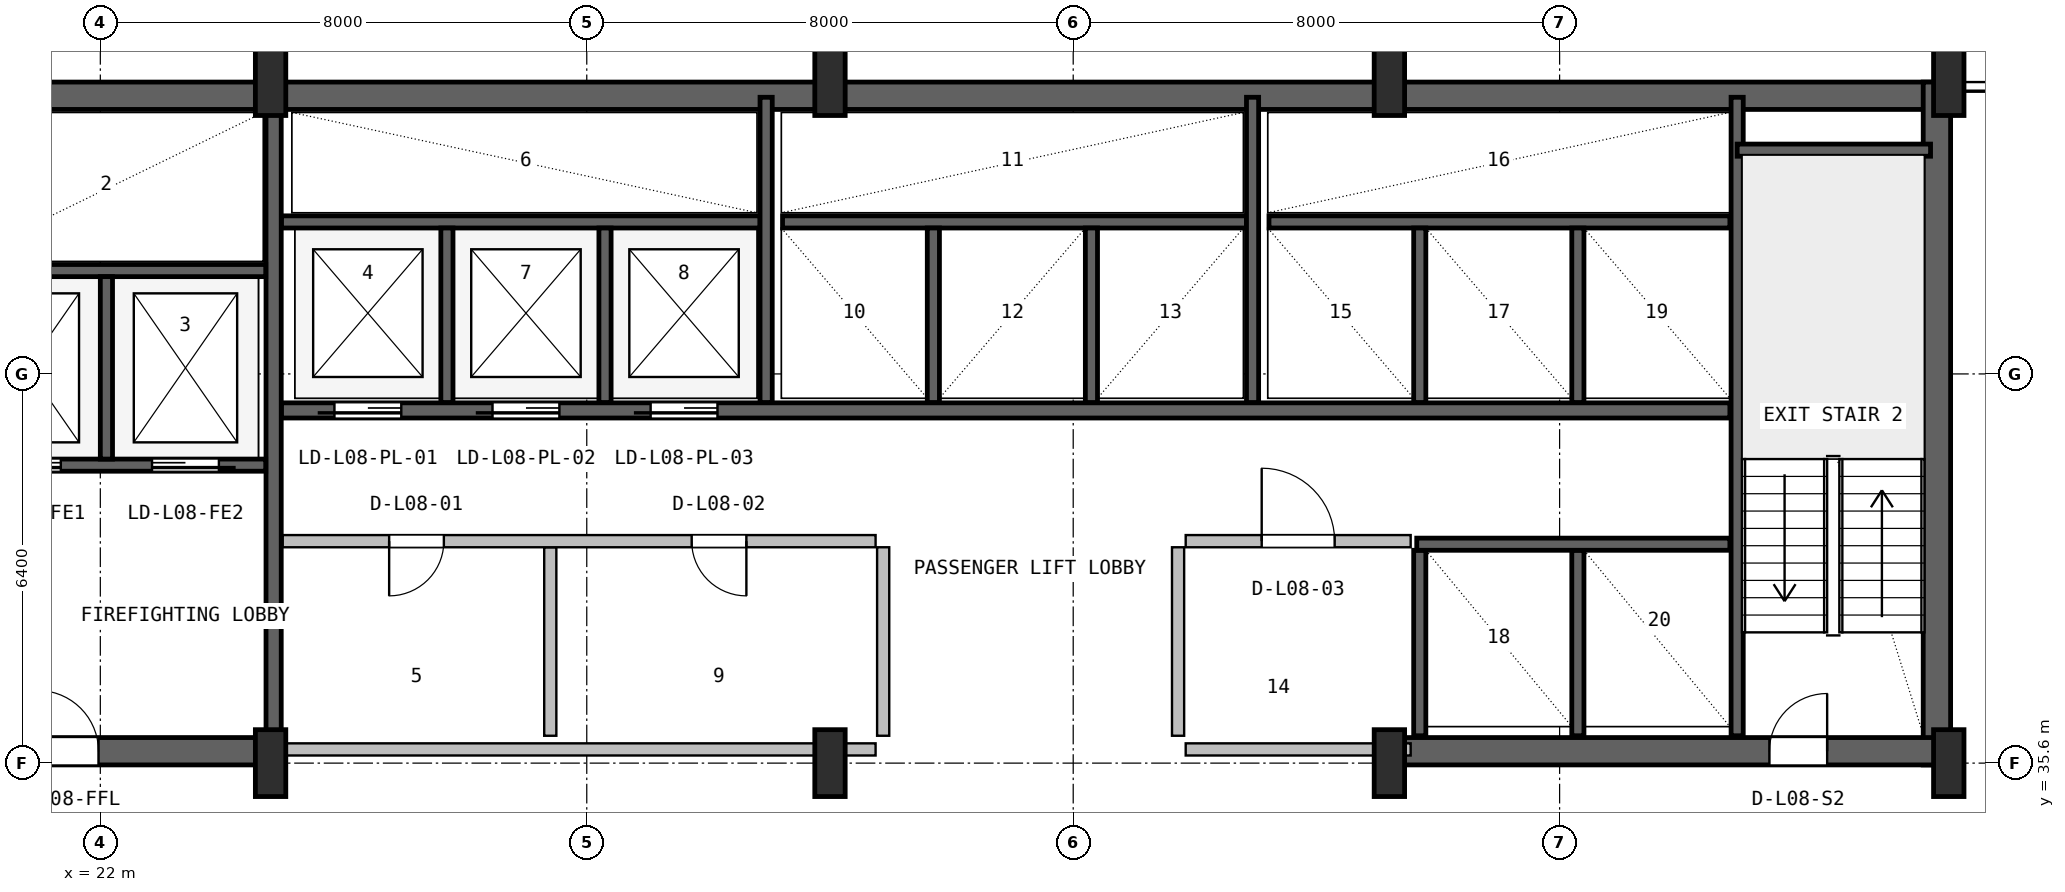
"""IFC4 building model, lengths in metres.
Left out: names, types, materials, properties, quantities, classifications, styles, units other than length and angle.
Written with IfcOpenShell. Run it as: python <this file> out.ifc"""

import sys

from ifc_helpers import new_model, si_unit, direction, frame, frame_2d, origin, origin_2d, place, context, subcontext, project, spatial, rectangle, i_section, extrude, source, transform, mapped, element, fill, save


model = new_model("IFC4")
c1 = context("Model", 3, precision=1e-05, world=origin(), true_north=direction((0.0, 1.0)))
c2 = subcontext(c1, "Body", "Model", "MODEL_VIEW")
j1 = project(units=[si_unit("LENGTHUNIT", "METRE"), si_unit("PLANEANGLEUNIT", "RADIAN")], contexts=[c1])
p1 = place(None, origin())
s1 = spatial("IfcSite", under=j1, at=p1, CompositionType="ELEMENT")
p2 = place(p1, origin())
s2 = spatial("IfcBuilding", under=s1, at=p2, CompositionType="ELEMENT")
p3 = place(p2, frame((0.0, 0.0, 39.3)))
s3 = spatial("IfcBuildingStorey", under=s2, at=p3, CompositionType="ELEMENT", Elevation=39.3)
p4 = place(p3, frame((15.6, 46.575, 0.0), z_axis=(0.0, 0.0, 1.0), x_axis=(1.0, 0.0, 0.0)))
e1 = element("IfcWall", 1, at=p4, inside=s3, PredefinedType="SHEAR", context=c2, shape_type="SweptSolid", body=[
    extrude(rectangle(XDim=36.8, YDim=0.45, at=frame_2d((18.4, 0.0))), origin(), (0.0, 0.0, 1.0), 3.65),
])
p5 = place(p3, frame((52.205, 35.57, 0.0), z_axis=(0.0, 0.0, 1.0), x_axis=(0.0, 1.0, 0.0)))
e2 = element("IfcWall", 2, at=p5, inside=s3, PredefinedType="SHEAR", context=c2, shape_type="SweptSolid", body=[
    extrude(rectangle(XDim=11.23, YDim=0.45, at=frame_2d((5.615, 0.0))), origin(), (0.0, 0.0, 1.0), 3.65),
])
p6 = place(p3, frame((15.57, 35.795, 0.0), z_axis=(0.0, 0.0, 1.0), x_axis=(1.0, 0.0, 0.0)))
e3 = element("IfcWall", 3, at=p6, inside=s3, PredefinedType="SHEAR", context=c2, shape_type="SweptSolid", body=[
    extrude(rectangle(XDim=9.23, YDim=0.45, at=frame_2d((4.615, 0.0))), origin(), (0.0, 0.0, 1.0), 3.65),
])
p7 = place(p6, frame((5.4, 0.0, 0.0)))
e4 = element("IfcOpeningElement", 4, at=p7, cuts=e3, PredefinedType="OPENING", context=c2, shape_type="SweptSolid", body=[
    extrude(rectangle(XDim=1.0, YDim=2.1, at=frame_2d((0.5, 1.05))), frame((0.0, 0.235, 0.0), z_axis=(0.0, -1.0, 0.0), x_axis=(1.0, 0.0, 0.0)), (0.0, 0.0, 1.0), 0.47),
])
p8 = place(p3, frame((43.2, 35.795, 0.0), z_axis=(0.0, 0.0, 1.0), x_axis=(1.0, 0.0, 0.0)))
e5 = element("IfcWall", 5, at=p8, inside=s3, PredefinedType="SHEAR", context=c2, shape_type="SweptSolid", body=[
    extrude(rectangle(XDim=9.23, YDim=0.45, at=frame_2d((4.615, 0.0))), origin(), (0.0, 0.0, 1.0), 3.65),
])
p9 = place(p8, frame((6.25, 0.0, 0.0)))
e6 = element("IfcOpeningElement", 6, at=p9, cuts=e5, PredefinedType="OPENING", context=c2, shape_type="SweptSolid", body=[
    extrude(rectangle(XDim=0.95, YDim=2.1, at=frame_2d((0.475, 1.05))), frame((0.0, 0.235, 0.0), z_axis=(0.0, -1.0, 0.0), x_axis=(1.0, 0.0, 0.0)), (0.0, 0.0, 1.0), 0.47),
])
m1 = source(origin(), c2, "Body", "SweptSolid", [
    extrude(i_section(OverallWidth=0.5, OverallDepth=1.1, WebThickness=0.018, FlangeThickness=0.032, FilletRadius=0.018, at=origin_2d()), origin(), (0.0, 0.0, 1.0), 3.9),
])
for number, where, z_axis, x_axis in (
    (7, (24.8, 35.6, 0.0), (0.0, 0.0, 1.0), (1.0, 0.0, 0.0)),
    (8, (24.8, 46.8, 0.0), (0.0, 0.0, 1.0), (1.0, 0.0, 0.0)),
    (9, (34.0, 35.6, 0.0), (0.0, 0.0, 1.0), (1.0, 0.0, 0.0)),
    (10, (34.0, 46.8, 0.0), (0.0, 0.0, 1.0), (1.0, 0.0, 0.0)),
    (11, (43.2, 35.6, 0.0), (0.0, 0.0, 1.0), (1.0, 0.0, 0.0)),
    (12, (43.2, 46.8, 0.0), (0.0, 0.0, 1.0), (1.0, 0.0, 0.0)),
    (13, (52.4, 35.6, 0.0), (0.0, 0.0, 1.0), (1.0, 0.0, 0.0)),
    (14, (52.4, 46.8, 0.0), (0.0, 0.0, 1.0), (1.0, 0.0, 0.0)),
):
    element("IfcColumn", number, at=place(p3, frame(where, z_axis=z_axis, x_axis=x_axis)), inside=s3, PredefinedType="COLUMN", context=c2, shape_type="MappedRepresentation", body=[
        mapped(m1, transform((0.0, 0.0, 0.0), x_axis=(1.0, 0.0, 0.0), y_axis=(0.0, 1.0, 0.0), z_axis=(0.0, 0.0, 1.0), scale=1.0)),
    ])
p10 = place(p3, frame((24.85, 36.05, 0.0), z_axis=(0.0, 0.0, 1.0), x_axis=(0.0, 1.0, 0.0)))
e15 = element("IfcWall", 15, at=p10, inside=s3, PredefinedType="SHEAR", context=c2, shape_type="SweptSolid", body=[
    extrude(rectangle(XDim=10.45, YDim=0.25, at=frame_2d((5.225, 0.0))), origin(), (0.0, 0.0, 1.0), 3.65),
])
p11 = place(p3, frame((19.2, 40.5, 0.0), z_axis=(0.0, 0.0, 1.0), x_axis=(1.0, 0.0, 0.0)))
e16 = element("IfcWall", 16, at=p11, inside=s3, PredefinedType="SHEAR", context=c2, shape_type="SweptSolid", body=[
    extrude(rectangle(XDim=5.52, YDim=0.2, at=frame_2d((2.76, 0.0))), origin(), (0.0, 0.0, 1.0), 3.65),
])
p12 = place(p11, frame((1.05, 0.0, 0.0)))
e17 = element("IfcOpeningElement", 17, at=p12, cuts=e16, PredefinedType="OPENING", context=c2, shape_type="SweptSolid", body=[
    extrude(rectangle(XDim=1.1, YDim=2.18, at=frame_2d((0.55, 1.09))), frame((0.0, 0.11, 0.0), z_axis=(0.0, -1.0, 0.0), x_axis=(1.0, 0.0, 0.0)), (0.0, 0.0, 1.0), 0.22),
])
p13 = place(p11, frame((3.65, 0.0, 0.0)))
e18 = element("IfcOpeningElement", 18, at=p13, cuts=e16, PredefinedType="OPENING", context=c2, shape_type="SweptSolid", body=[
    extrude(rectangle(XDim=1.1, YDim=2.18, at=frame_2d((0.55, 1.09))), frame((0.0, 0.11, 0.0), z_axis=(0.0, -1.0, 0.0), x_axis=(1.0, 0.0, 0.0)), (0.0, 0.0, 1.0), 0.22),
])
p14 = place(p3, frame((19.2, 43.7, 0.0), z_axis=(0.0, 0.0, 1.0), x_axis=(1.0, 0.0, 0.0)))
e19 = element("IfcWall", 19, at=p14, inside=s3, PredefinedType="SHEAR", context=c2, shape_type="SweptSolid", body=[
    extrude(rectangle(XDim=5.52, YDim=0.2, at=frame_2d((2.76, 0.0))), origin(), (0.0, 0.0, 1.0), 3.65),
])
p15 = place(p3, frame((22.1, 40.6, 0.0), z_axis=(0.0, 0.0, 1.0), x_axis=(0.0, 1.0, 0.0)))
e20 = element("IfcWall", 20, at=p15, inside=s3, PredefinedType="SHEAR", context=c2, shape_type="SweptSolid", body=[
    extrude(rectangle(XDim=3.0, YDim=0.2, at=frame_2d((1.5, 0.0))), origin(), (0.0, 0.0, 1.0), 3.65),
])
p16 = place(p3, frame((48.92, 36.05, 0.0), z_axis=(0.0, 0.0, 1.0), x_axis=(0.0, 1.0, 0.0)))
e21 = element("IfcWall", 21, at=p16, inside=s3, PredefinedType="SHEAR", context=c2, shape_type="SweptSolid", body=[
    extrude(rectangle(XDim=10.5, YDim=0.2, at=frame_2d((5.25, 0.0))), origin(), (0.0, 0.0, 1.0), 3.65),
])
p17 = place(p3, frame((48.92, 45.68, 0.0), z_axis=(0.0, 0.0, 1.0), x_axis=(1.0, 0.0, 0.0)))
e22 = element("IfcWall", 22, at=p17, inside=s3, PredefinedType="SHEAR", context=c2, shape_type="SweptSolid", body=[
    extrude(rectangle(XDim=3.18, YDim=0.2, at=frame_2d((1.59, 0.0))), origin(), (0.0, 0.0, 1.0), 3.65),
])
p18 = place(p3, frame((24.98, 41.4, 0.0), z_axis=(0.0, 0.0, 1.0), x_axis=(1.0, 0.0, 0.0)))
e23 = element("IfcWall", 23, at=p18, inside=s3, PredefinedType="SHEAR", context=c2, shape_type="SweptSolid", body=[
    extrude(rectangle(XDim=23.82, YDim=0.25, at=frame_2d((11.91, 0.0))), origin(), (0.0, 0.0, 1.0), 3.65),
])
p19 = place(p18, frame((0.87, 0.0, 0.0)))
e24 = element("IfcOpeningElement", 24, at=p19, cuts=e23, PredefinedType="OPENING", context=c2, shape_type="SweptSolid", body=[
    extrude(rectangle(XDim=1.1, YDim=2.18, at=frame_2d((0.55, 1.09))), frame((0.0, 0.135, 0.0), z_axis=(0.0, -1.0, 0.0), x_axis=(1.0, 0.0, 0.0)), (0.0, 0.0, 1.0), 0.27),
])
p20 = place(p18, frame((3.47, 0.0, 0.0)))
e25 = element("IfcOpeningElement", 25, at=p20, cuts=e23, PredefinedType="OPENING", context=c2, shape_type="SweptSolid", body=[
    extrude(rectangle(XDim=1.1, YDim=2.18, at=frame_2d((0.55, 1.09))), frame((0.0, 0.135, 0.0), z_axis=(0.0, -1.0, 0.0), x_axis=(1.0, 0.0, 0.0)), (0.0, 0.0, 1.0), 0.27),
])
p21 = place(p18, frame((6.07, 0.0, 0.0)))
e26 = element("IfcOpeningElement", 26, at=p21, cuts=e23, PredefinedType="OPENING", context=c2, shape_type="SweptSolid", body=[
    extrude(rectangle(XDim=1.1, YDim=2.18, at=frame_2d((0.55, 1.09))), frame((0.0, 0.135, 0.0), z_axis=(0.0, -1.0, 0.0), x_axis=(1.0, 0.0, 0.0)), (0.0, 0.0, 1.0), 0.27),
])
p22 = place(p3, frame((24.98, 44.5, 0.0), z_axis=(0.0, 0.0, 1.0), x_axis=(1.0, 0.0, 0.0)))
e27 = element("IfcWall", 27, at=p22, inside=s3, PredefinedType="SHEAR", context=c2, shape_type="SweptSolid", body=[
    extrude(rectangle(XDim=7.87, YDim=0.2, at=frame_2d((3.935, 0.0))), origin(), (0.0, 0.0, 1.0), 3.65),
])
for number, where, z_axis, x_axis in (
    (28, (27.7, 41.53, 0.0), (0.0, 0.0, 1.0), (0.0, 1.0, 0.0)),
    (29, (30.3, 41.53, 0.0), (0.0, 0.0, 1.0), (0.0, 1.0, 0.0)),
):
    element("IfcWall", number, at=place(p3, frame(where, z_axis=z_axis, x_axis=x_axis)), inside=s3, PredefinedType="SHEAR", context=c2, shape_type="SweptSolid", body=[
        extrude(rectangle(XDim=2.87, YDim=0.2, at=frame_2d((1.435, 0.0))), origin(), (0.0, 0.0, 1.0), 3.65),
    ])
p23 = place(p3, frame((32.95, 41.53, 0.0), z_axis=(0.0, 0.0, 1.0), x_axis=(0.0, 1.0, 0.0)))
e30 = element("IfcWall", 30, at=p23, inside=s3, PredefinedType="SHEAR", context=c2, shape_type="SweptSolid", body=[
    extrude(rectangle(XDim=5.02, YDim=0.2, at=frame_2d((2.51, 0.0))), origin(), (0.0, 0.0, 1.0), 3.65),
])
p24 = place(p3, frame((33.22, 44.5, 0.0), z_axis=(0.0, 0.0, 1.0), x_axis=(1.0, 0.0, 0.0)))
e31 = element("IfcWall", 31, at=p24, inside=s3, PredefinedType="SHEAR", context=c2, shape_type="SweptSolid", body=[
    extrude(rectangle(XDim=7.63, YDim=0.2, at=frame_2d((3.815, 0.0))), origin(), (0.0, 0.0, 1.0), 3.65),
])
for number, where, z_axis, x_axis in (
    (32, (35.7, 41.53, 0.0), (0.0, 0.0, 1.0), (0.0, 1.0, 0.0)),
    (33, (38.3, 41.53, 0.0), (0.0, 0.0, 1.0), (0.0, 1.0, 0.0)),
):
    element("IfcWall", number, at=place(p3, frame(where, z_axis=z_axis, x_axis=x_axis)), inside=s3, PredefinedType="SHEAR", context=c2, shape_type="SweptSolid", body=[
        extrude(rectangle(XDim=2.87, YDim=0.2, at=frame_2d((1.435, 0.0))), origin(), (0.0, 0.0, 1.0), 3.65),
    ])
p25 = place(p3, frame((40.95, 41.53, 0.0), z_axis=(0.0, 0.0, 1.0), x_axis=(0.0, 1.0, 0.0)))
e34 = element("IfcWall", 34, at=p25, inside=s3, PredefinedType="SHEAR", context=c2, shape_type="SweptSolid", body=[
    extrude(rectangle(XDim=5.02, YDim=0.2, at=frame_2d((2.51, 0.0))), origin(), (0.0, 0.0, 1.0), 3.65),
])
p26 = place(p3, frame((41.22, 44.5, 0.0), z_axis=(0.0, 0.0, 1.0), x_axis=(1.0, 0.0, 0.0)))
e35 = element("IfcWall", 35, at=p26, inside=s3, PredefinedType="SHEAR", context=c2, shape_type="SweptSolid", body=[
    extrude(rectangle(XDim=7.58, YDim=0.2, at=frame_2d((3.79, 0.0))), origin(), (0.0, 0.0, 1.0), 3.65),
])
for number, where, z_axis, x_axis in (
    (36, (43.7, 41.53, 0.0), (0.0, 0.0, 1.0), (0.0, 1.0, 0.0)),
    (37, (46.3, 41.53, 0.0), (0.0, 0.0, 1.0), (0.0, 1.0, 0.0)),
):
    element("IfcWall", number, at=place(p3, frame(where, z_axis=z_axis, x_axis=x_axis)), inside=s3, PredefinedType="SHEAR", context=c2, shape_type="SweptSolid", body=[
        extrude(rectangle(XDim=2.87, YDim=0.2, at=frame_2d((1.435, 0.0))), origin(), (0.0, 0.0, 1.0), 3.65),
    ])
for number, where, z_axis, x_axis in (
    (38, (43.7, 36.05, 0.0), (0.0, 0.0, 1.0), (0.0, 1.0, 0.0)),
    (39, (46.3, 36.05, 0.0), (0.0, 0.0, 1.0), (0.0, 1.0, 0.0)),
):
    element("IfcWall", number, at=place(p3, frame(where, z_axis=z_axis, x_axis=x_axis)), inside=s3, PredefinedType="SHEAR", context=c2, shape_type="SweptSolid", body=[
        extrude(rectangle(XDim=3.05, YDim=0.2, at=frame_2d((1.525, 0.0))), origin(), (0.0, 0.0, 1.0), 3.65),
    ])
p27 = place(p3, frame((43.65, 39.2, 0.0), z_axis=(0.0, 0.0, 1.0), x_axis=(1.0, 0.0, 0.0)))
e40 = element("IfcWall", 40, at=p27, inside=s3, PredefinedType="SHEAR", context=c2, shape_type="SweptSolid", body=[
    extrude(rectangle(XDim=5.15, YDim=0.2, at=frame_2d((2.575, 0.0))), origin(), (0.0, 0.0, 1.0), 3.65),
])
p28 = place(p3, frame((25.0, 35.825, 0.0), z_axis=(0.0, 0.0, 1.0), x_axis=(1.0, 0.0, 0.0)))
e41 = element("IfcWall", 41, at=p28, inside=s3, PredefinedType="PLUMBINGWALL", context=c2, shape_type="SweptSolid", body=[
    extrude(rectangle(XDim=9.75, YDim=0.2, at=frame_2d((4.875, 0.0))), origin(), (0.0, 0.0, 1.0), 2.425),
])
p29 = place(p3, frame((29.4, 36.05, 0.0), z_axis=(0.0, 0.0, 1.0), x_axis=(0.0, 1.0, 0.0)))
e42 = element("IfcWall", 42, at=p29, inside=s3, PredefinedType="PLUMBINGWALL", context=c2, shape_type="SweptSolid", body=[
    extrude(rectangle(XDim=3.1, YDim=0.2, at=frame_2d((1.55, 0.0))), origin(), (0.0, 0.0, 1.0), 3.63),
])
p30 = place(p3, frame((25.0, 39.25, 0.0), z_axis=(0.0, 0.0, 1.0), x_axis=(1.0, 0.0, 0.0)))
e43 = element("IfcWall", 43, at=p30, inside=s3, PredefinedType="PLUMBINGWALL", context=c2, shape_type="SweptSolid", body=[
    extrude(rectangle(XDim=9.75, YDim=0.2, at=frame_2d((4.875, 0.0))), origin(), (0.0, 0.0, 1.0), 3.63),
])
p31 = place(p30, frame((1.75, 0.0, 0.0)))
e44 = element("IfcOpeningElement", 44, at=p31, cuts=e43, PredefinedType="OPENING", context=c2, shape_type="SweptSolid", body=[
    extrude(rectangle(XDim=0.9, YDim=2.06, at=frame_2d((0.45, 1.03))), frame((0.0, 0.11, 0.0), z_axis=(0.0, -1.0, 0.0), x_axis=(1.0, 0.0, 0.0)), (0.0, 0.0, 1.0), 0.22),
])
p32 = place(p30, frame((6.725, 0.0, 0.0)))
e45 = element("IfcOpeningElement", 45, at=p32, cuts=e43, PredefinedType="OPENING", context=c2, shape_type="SweptSolid", body=[
    extrude(rectangle(XDim=0.9, YDim=2.06, at=frame_2d((0.45, 1.03))), frame((0.0, 0.11, 0.0), z_axis=(0.0, -1.0, 0.0), x_axis=(1.0, 0.0, 0.0)), (0.0, 0.0, 1.0), 0.22),
])
p33 = place(p3, frame((34.875, 36.05, 0.0), z_axis=(0.0, 0.0, 1.0), x_axis=(0.0, 1.0, 0.0)))
e46 = element("IfcWall", 46, at=p33, inside=s3, PredefinedType="PLUMBINGWALL", context=c2, shape_type="SweptSolid", body=[
    extrude(rectangle(XDim=3.1, YDim=0.2, at=frame_2d((1.55, 0.0))), origin(), (0.0, 0.0, 1.0), 3.63),
])
p34 = place(p3, frame((39.85, 35.825, 0.0), z_axis=(0.0, 0.0, 1.0), x_axis=(1.0, 0.0, 0.0)))
e47 = element("IfcWall", 47, at=p34, inside=s3, PredefinedType="SOLIDWALL", context=c2, shape_type="SweptSolid", body=[
    extrude(rectangle(XDim=3.7, YDim=0.2, at=frame_2d((1.85, 0.0))), origin(), (0.0, 0.0, 1.0), 2.425),
])
p35 = place(p3, frame((39.85, 39.25, 0.0), z_axis=(0.0, 0.0, 1.0), x_axis=(1.0, 0.0, 0.0)))
e48 = element("IfcWall", 48, at=p35, inside=s3, PredefinedType="SOLIDWALL", context=c2, shape_type="SweptSolid", body=[
    extrude(rectangle(XDim=3.7, YDim=0.2, at=frame_2d((1.85, 0.0))), origin(), (0.0, 0.0, 1.0), 3.63),
])
p36 = place(p35, frame((1.25, 0.0, 0.0)))
e49 = element("IfcOpeningElement", 49, at=p36, cuts=e48, PredefinedType="OPENING", context=c2, shape_type="SweptSolid", body=[
    extrude(rectangle(XDim=1.2, YDim=2.1, at=frame_2d((0.6, 1.05))), frame((0.0, 0.11, 0.0), z_axis=(0.0, -1.0, 0.0), x_axis=(1.0, 0.0, 0.0)), (0.0, 0.0, 1.0), 0.22),
])
p37 = place(p3, frame((39.725, 36.05, 0.0), z_axis=(0.0, 0.0, 1.0), x_axis=(0.0, 1.0, 0.0)))
e50 = element("IfcWall", 50, at=p37, inside=s3, PredefinedType="SOLIDWALL", context=c2, shape_type="SweptSolid", body=[
    extrude(rectangle(XDim=3.1, YDim=0.2, at=frame_2d((1.55, 0.0))), origin(), (0.0, 0.0, 1.0), 3.63),
])
m2 = source(origin(), c2, "Body", "SweptSolid", [
    extrude(rectangle(XDim=1.0, YDim=2.1, at=frame_2d((0.5, 1.05))), frame((0.0, 0.025, 0.0), z_axis=(0.0, -1.0, 0.0), x_axis=(1.0, 0.0, 0.0)), (0.0, 0.0, 1.0), 0.05),
])
p38 = place(p7, origin())
e51 = element("IfcDoor", 51, at=p38, inside=s3, OperationType="SINGLE_SWING_LEFT", PredefinedType="DOOR", context=c2, shape_type="MappedRepresentation", body=[
    mapped(m2, transform((0.0, 0.0, 0.0), x_axis=(1.0, 0.0, 0.0), y_axis=(0.0, 1.0, 0.0), z_axis=(0.0, 0.0, 1.0), scale=1.0)),
])
fill(e4, e51)
m3 = source(origin(), c2, "Body", "SweptSolid", [
    extrude(rectangle(XDim=1.1, YDim=2.18, at=frame_2d((0.55, 1.09))), frame((0.0, 0.025, 0.0), z_axis=(0.0, -1.0, 0.0), x_axis=(1.0, 0.0, 0.0)), (0.0, 0.0, 1.0), 0.05),
])
p39 = place(p12, frame((1.1, 0.0, 0.0), z_axis=(0.0, 0.0, 1.0), x_axis=(-1.0, 0.0, 0.0)))
e52 = element("IfcDoor", 52, at=p39, inside=s3, OperationType="SLIDING_TO_LEFT", PredefinedType="DOOR", context=c2, shape_type="MappedRepresentation", body=[
    mapped(m3, transform((0.0, 0.0, 0.0), x_axis=(1.0, 0.0, 0.0), y_axis=(0.0, 1.0, 0.0), z_axis=(0.0, 0.0, 1.0), scale=1.0)),
])
fill(e17, e52)
p40 = place(p13, frame((1.1, 0.0, 0.0), z_axis=(0.0, 0.0, 1.0), x_axis=(-1.0, 0.0, 0.0)))
e53 = element("IfcDoor", 53, at=p40, inside=s3, OperationType="SLIDING_TO_RIGHT", PredefinedType="DOOR", context=c2, shape_type="MappedRepresentation", body=[
    mapped(m3, transform((0.0, 0.0, 0.0), x_axis=(1.0, 0.0, 0.0), y_axis=(0.0, 1.0, 0.0), z_axis=(0.0, 0.0, 1.0), scale=1.0)),
])
fill(e18, e53)
m4 = source(origin(), c2, "Body", "SweptSolid", [
    extrude(rectangle(XDim=0.95, YDim=2.1, at=frame_2d((0.475, 1.05))), frame((0.0, 0.025, 0.0), z_axis=(0.0, -1.0, 0.0), x_axis=(1.0, 0.0, 0.0)), (0.0, 0.0, 1.0), 0.05),
])
p41 = place(p9, origin())
e54 = element("IfcDoor", 54, at=p41, inside=s3, OperationType="SINGLE_SWING_RIGHT", PredefinedType="DOOR", context=c2, shape_type="MappedRepresentation", body=[
    mapped(m4, transform((0.0, 0.0, 0.0), x_axis=(1.0, 0.0, 0.0), y_axis=(0.0, 1.0, 0.0), z_axis=(0.0, 0.0, 1.0), scale=1.0)),
])
fill(e6, e54)
p42 = place(p19, frame((1.1, 0.0, 0.0), z_axis=(0.0, 0.0, 1.0), x_axis=(-1.0, 0.0, 0.0)))
e55 = element("IfcDoor", 55, at=p42, inside=s3, OperationType="SLIDING_TO_LEFT", PredefinedType="DOOR", context=c2, shape_type="MappedRepresentation", body=[
    mapped(m3, transform((0.0, 0.0, 0.0), x_axis=(1.0, 0.0, 0.0), y_axis=(0.0, 1.0, 0.0), z_axis=(0.0, 0.0, 1.0), scale=1.0)),
])
fill(e24, e55)
p43 = place(p20, frame((1.1, 0.0, 0.0), z_axis=(0.0, 0.0, 1.0), x_axis=(-1.0, 0.0, 0.0)))
e56 = element("IfcDoor", 56, at=p43, inside=s3, OperationType="SLIDING_TO_LEFT", PredefinedType="DOOR", context=c2, shape_type="MappedRepresentation", body=[
    mapped(m3, transform((0.0, 0.0, 0.0), x_axis=(1.0, 0.0, 0.0), y_axis=(0.0, 1.0, 0.0), z_axis=(0.0, 0.0, 1.0), scale=1.0)),
])
fill(e25, e56)
p44 = place(p21, frame((1.1, 0.0, 0.0), z_axis=(0.0, 0.0, 1.0), x_axis=(-1.0, 0.0, 0.0)))
e57 = element("IfcDoor", 57, at=p44, inside=s3, OperationType="SLIDING_TO_LEFT", PredefinedType="DOOR", context=c2, shape_type="MappedRepresentation", body=[
    mapped(m3, transform((0.0, 0.0, 0.0), x_axis=(1.0, 0.0, 0.0), y_axis=(0.0, 1.0, 0.0), z_axis=(0.0, 0.0, 1.0), scale=1.0)),
])
fill(e26, e57)
m5 = source(origin(), c2, "Body", "SweptSolid", [
    extrude(rectangle(XDim=0.9, YDim=2.06, at=frame_2d((0.45, 1.03))), frame((0.0, 0.025, 0.0), z_axis=(0.0, -1.0, 0.0), x_axis=(1.0, 0.0, 0.0)), (0.0, 0.0, 1.0), 0.05),
])
p45 = place(p31, frame((0.9, 0.0, 0.0), z_axis=(0.0, 0.0, 1.0), x_axis=(-1.0, 0.0, 0.0)))
e58 = element("IfcDoor", 58, at=p45, inside=s3, OperationType="SINGLE_SWING_LEFT", PredefinedType="DOOR", context=c2, shape_type="MappedRepresentation", body=[
    mapped(m5, transform((0.0, 0.0, 0.0), x_axis=(1.0, 0.0, 0.0), y_axis=(0.0, 1.0, 0.0), z_axis=(0.0, 0.0, 1.0), scale=1.0)),
])
fill(e44, e58)
p46 = place(p32, frame((0.9, 0.0, 0.0), z_axis=(0.0, 0.0, 1.0), x_axis=(-1.0, 0.0, 0.0)))
e59 = element("IfcDoor", 59, at=p46, inside=s3, OperationType="SINGLE_SWING_RIGHT", PredefinedType="DOOR", context=c2, shape_type="MappedRepresentation", body=[
    mapped(m5, transform((0.0, 0.0, 0.0), x_axis=(1.0, 0.0, 0.0), y_axis=(0.0, 1.0, 0.0), z_axis=(0.0, 0.0, 1.0), scale=1.0)),
])
fill(e45, e59)
m6 = source(origin(), c2, "Body", "SweptSolid", [
    extrude(rectangle(XDim=1.2, YDim=2.1, at=frame_2d((0.6, 1.05))), frame((0.0, 0.025, 0.0), z_axis=(0.0, -1.0, 0.0), x_axis=(1.0, 0.0, 0.0)), (0.0, 0.0, 1.0), 0.05),
])
p47 = place(p36, origin())
e60 = element("IfcDoor", 60, at=p47, inside=s3, OperationType="SINGLE_SWING_LEFT", PredefinedType="DOOR", context=c2, shape_type="MappedRepresentation", body=[
    mapped(m6, transform((0.0, 0.0, 0.0), x_axis=(1.0, 0.0, 0.0), y_axis=(0.0, 1.0, 0.0), z_axis=(0.0, 0.0, 1.0), scale=1.0)),
])
fill(e49, e60)
save(model, sys.argv[1])
